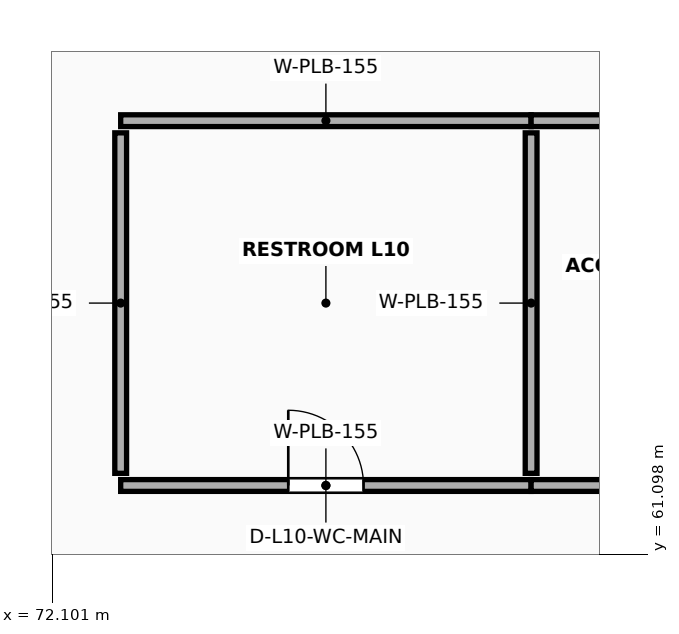
"""IFC4 building model, lengths in metres.
Left out: names, types, materials, properties, quantities, classifications, styles, units other than length and angle.
Written with IfcOpenShell. Run it as: python <this file> out.ifc"""

import sys

from ifc_helpers import new_model, si_unit, direction, frame, frame_2d, origin, place, context, subcontext, project, spatial, rectangle, extrude, element, fill, save


model = new_model("IFC4")
c1 = context("Model", 3, precision=1e-05, world=origin(), true_north=direction((0.0, 1.0)))
c2 = subcontext(c1, "Body", "Model", "MODEL_VIEW")
j1 = project(units=[si_unit("LENGTHUNIT", "METRE"), si_unit("PLANEANGLEUNIT", "RADIAN")], contexts=[c1])
p1 = place(None, origin())
s1 = spatial("IfcSite", under=j1, at=p1, CompositionType="ELEMENT")
p2 = place(p1, origin())
s2 = spatial("IfcBuilding", under=s1, at=p2, CompositionType="ELEMENT")
p3 = place(p2, frame((0.0, 0.0, 41.6)))
s3 = spatial("IfcBuildingStorey", under=s2, at=p3, CompositionType="ELEMENT", Elevation=41.6)
p4 = place(p3, frame((73.0, 62.0, 0.0), z_axis=(0.0, 0.0, 1.0), x_axis=(1.0, 0.0, 0.0)))
e1 = element("IfcWall", 1, at=p4, inside=s3, PredefinedType="PLUMBINGWALL", context=c2, shape_type="SweptSolid", body=[
    extrude(rectangle(XDim=5.4, YDim=0.155, at=frame_2d((2.7, 0.0))), origin(), (0.0, 0.0, 1.0), 2.88),
])
p5 = place(p4, frame((2.205, 0.0, 0.0)))
e2 = element("IfcOpeningElement", 2, at=p5, cuts=e1, PredefinedType="OPENING", context=c2, shape_type="SweptSolid", body=[
    extrude(rectangle(XDim=0.99, YDim=2.15, at=frame_2d((0.495, 1.075))), frame((0.0, 0.093, 0.0), z_axis=(0.0, -1.0, 0.0), x_axis=(1.0, 0.0, 0.0)), (0.0, 0.0, 1.0), 0.185),
])
p6 = place(p3, frame((73.0, 66.8, 0.0), z_axis=(0.0, 0.0, 1.0), x_axis=(1.0, 0.0, 0.0)))
e3 = element("IfcWall", 3, at=p6, inside=s3, PredefinedType="PLUMBINGWALL", context=c2, shape_type="SweptSolid", body=[
    extrude(rectangle(XDim=5.4, YDim=0.155, at=frame_2d((2.7, 0.0))), origin(), (0.0, 0.0, 1.0), 2.88),
])
for number, where, z_axis, x_axis in (
    (4, (73.0, 62.16, 0.0), (0.0, 0.0, 1.0), (0.0, 1.0, 0.0)),
    (5, (78.4, 62.16, 0.0), (0.0, 0.0, 1.0), (0.0, 1.0, 0.0)),
):
    element("IfcWall", number, at=place(p3, frame(where, z_axis=z_axis, x_axis=x_axis)), inside=s3, PredefinedType="PLUMBINGWALL", context=c2, shape_type="SweptSolid", body=[
        extrude(rectangle(XDim=4.48, YDim=0.155, at=frame_2d((2.24, 0.0))), origin(), (0.0, 0.0, 1.0), 2.88),
    ])
p7 = place(p3, frame((78.4, 62.0, 0.0), z_axis=(0.0, 0.0, 1.0), x_axis=(1.0, 0.0, 0.0)))
e6 = element("IfcWall", 6, at=p7, inside=s3, PredefinedType="PLUMBINGWALL", context=c2, shape_type="SweptSolid", body=[
    extrude(rectangle(XDim=3.8, YDim=0.155, at=frame_2d((1.9, 0.0))), origin(), (0.0, 0.0, 1.0), 2.88),
])
p8 = place(p7, frame((1.385, 0.0, 0.0)))
e7 = element("IfcOpeningElement", 7, at=p8, cuts=e6, PredefinedType="OPENING", context=c2, shape_type="SweptSolid", body=[
    extrude(rectangle(XDim=1.03, YDim=2.17, at=frame_2d((0.515, 1.085))), frame((0.0, 0.093, 0.0), z_axis=(0.0, -1.0, 0.0), x_axis=(1.0, 0.0, 0.0)), (0.0, 0.0, 1.0), 0.185),
])
p9 = place(p3, frame((78.4, 66.8, 0.0), z_axis=(0.0, 0.0, 1.0), x_axis=(1.0, 0.0, 0.0)))
e8 = element("IfcWall", 8, at=p9, inside=s3, PredefinedType="PLUMBINGWALL", context=c2, shape_type="SweptSolid", body=[
    extrude(rectangle(XDim=3.8, YDim=0.155, at=frame_2d((1.9, 0.0))), origin(), (0.0, 0.0, 1.0), 2.88),
])
p10 = place(p5, origin())
e9 = element("IfcDoor", 9, at=p10, inside=s3, OperationType="SINGLE_SWING_LEFT", PredefinedType="DOOR", context=c2, shape_type="SweptSolid", body=[
    extrude(rectangle(XDim=0.99, YDim=2.15, at=frame_2d((0.495, 1.075))), frame((0.0, 0.025, 0.0), z_axis=(0.0, -1.0, 0.0), x_axis=(1.0, 0.0, 0.0)), (0.0, 0.0, 1.0), 0.05),
])
fill(e2, e9)
save(model, sys.argv[1])
